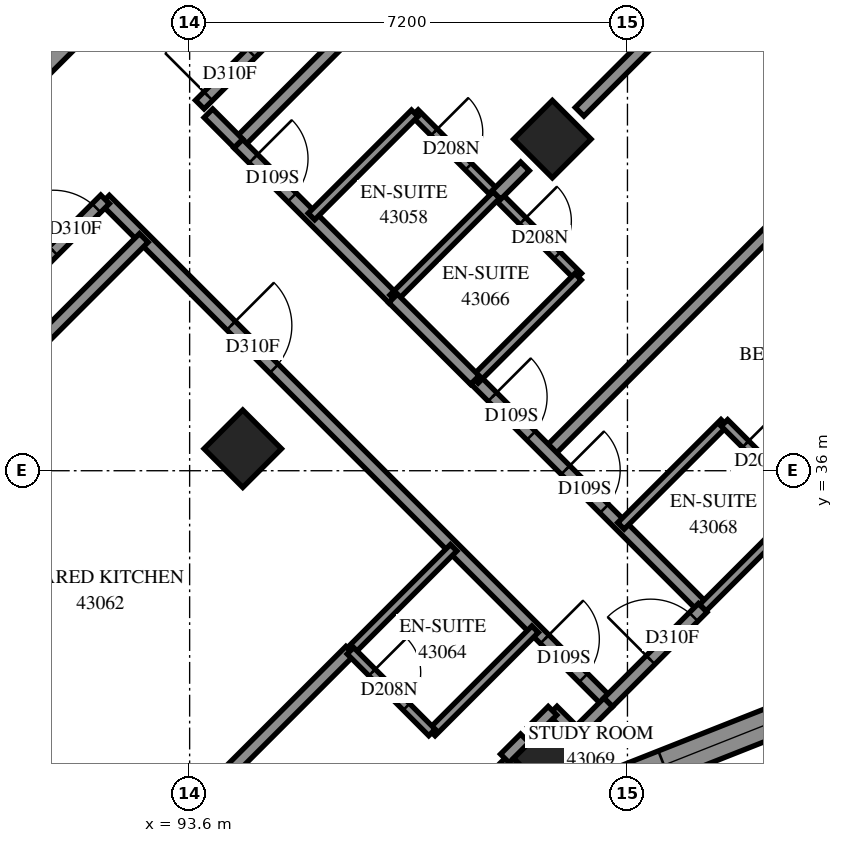
"""IFC4 building model, lengths in metres.
Left out: names, types, materials, properties, quantities, classifications, styles, units other than length and angle.
Written with IfcOpenShell. Run it as: python <this file> out.ifc"""

import sys

from ifc_helpers import new_model, si_unit, direction, frame, frame_2d, origin, origin_2d, place, context, subcontext, project, spatial, polyline, rectangle, outline, extrude, element, fill, save


model = new_model("IFC4")
c1 = context("Model", 3, precision=1e-05, world=origin(), true_north=direction((0.0, 1.0)))
c2 = subcontext(c1, "Body", "Model", "MODEL_VIEW")
j1 = project(units=[si_unit("LENGTHUNIT", "METRE"), si_unit("PLANEANGLEUNIT", "RADIAN")], contexts=[c1])
p1 = place(None, origin())
s1 = spatial("IfcSite", under=j1, at=p1, CompositionType="ELEMENT")
p2 = place(p1, origin())
s2 = spatial("IfcBuilding", under=s1, at=p2, CompositionType="ELEMENT")
p3 = place(p2, frame((0.0, 0.0, 159.2)))
s3 = spatial("IfcBuildingStorey", under=s2, at=p3, CompositionType="ELEMENT", Elevation=159.2)
for number, where, z_axis, x_axis in (
    (1, (99.565, 41.453, 0.0), (0.0, 0.0, 1.0), (0.707, -0.707, 0.0)),
    (2, (94.474, 36.362, 0.0), (0.0, 0.0, 1.0), (0.707, -0.707, 0.0)),
    (3, (99.565, 31.271, 0.0), (0.0, 0.0, 1.0), (0.707, -0.707, 0.0)),
):
    element("IfcColumn", number, at=place(p3, frame(where, z_axis=z_axis, x_axis=x_axis)), inside=s3, PredefinedType="COLUMN", context=c2, shape_type="SweptSolid", body=[
        extrude(rectangle(XDim=0.9, YDim=0.9, at=origin_2d()), origin(), (0.0, 0.0, 1.0), 3.1),
    ])
p4 = place(p3, frame((87.049, 38.695, -0.3), z_axis=(0.0, 0.0, 1.0), x_axis=(0.7071067812, 0.7071067812, 0.0)))
e4 = element("IfcWall", 4, at=p4, inside=s3, PredefinedType="SHEAR", context=c2, shape_type="SweptSolid", body=[
    extrude(rectangle(XDim=14.4, YDim=0.6, at=frame_2d((7.2, 0.0))), origin(), (0.0, 0.0, 1.0), 2.7),
])
p5 = place(p4, frame((4.55, 0.0, 0.3)))
e5 = element("IfcOpeningElement", 5, at=p5, cuts=e4, PredefinedType="OPENING", context=c2, shape_type="SweptSolid", body=[
    extrude(rectangle(XDim=1.1, YDim=2.1, at=frame_2d((0.55, 1.05))), frame((0.0, 0.31, 0.0), z_axis=(0.0, -1.0, 0.0), x_axis=(1.0, 0.0, 0.0)), (0.0, 0.0, 1.0), 0.62),
])
p6 = place(p4, frame((11.35, 0.0, 0.3)))
e6 = element("IfcOpeningElement", 6, at=p6, cuts=e4, PredefinedType="OPENING", context=c2, shape_type="SweptSolid", body=[
    extrude(rectangle(XDim=1.1, YDim=2.1, at=frame_2d((0.55, 1.05))), frame((0.0, 0.31, 0.0), z_axis=(0.0, -1.0, 0.0), x_axis=(1.0, 0.0, 0.0)), (0.0, 0.0, 1.0), 0.62),
])
p7 = place(p3, frame((100.817, 30.929, 0.0), z_axis=(0.0, 0.0, 1.0), x_axis=(0.9299300863, 0.3677363656, 0.0)))
e7 = element("IfcWall", 7, at=p7, inside=s3, PredefinedType="SOLIDWALL", context=c2, shape_type="SweptSolid", body=[
    extrude(outline(polyline([(0.108, -0.25), (5.642, -0.25), (5.416, 0.25), (-0.108, 0.25), (0.108, -0.25)])), origin(), (0.0, 0.0, 1.0), 3.1),
])
p8 = place(p7, frame((0.626, 0.0, 0.45)))
e8 = element("IfcOpeningElement", 8, at=p8, cuts=e7, PredefinedType="OPENING", context=c2, shape_type="SweptSolid", body=[
    extrude(rectangle(XDim=2.8, YDim=2.5, at=frame_2d((1.4, 1.25))), frame((0.0, 0.26, 0.0), z_axis=(0.0, -1.0, 0.0), x_axis=(1.0, 0.0, 0.0)), (0.0, 0.0, 1.0), 0.52),
])
p9 = place(p3, frame((94.401, 41.383, 0.0), z_axis=(0.0, 0.0, 1.0), x_axis=(0.7071067812, 0.7071067812, 0.0)))
e9 = element("IfcWall", 9, at=p9, inside=s3, PredefinedType="PARTITIONING", context=c2, shape_type="SweptSolid", body=[
    extrude(rectangle(XDim=12.04, YDim=0.2, at=frame_2d((6.02, 0.0))), origin(), (0.0, 0.0, 1.0), 3.1),
])
p10 = place(p3, frame((92.209, 40.459, 0.0), z_axis=(0.0, 0.0, 1.0), x_axis=(0.7071067812, -0.7071067812, 0.0)))
e10 = element("IfcWall", 10, at=p10, inside=s3, PredefinedType="PARTITIONING", context=c2, shape_type="SweptSolid", body=[
    extrude(rectangle(XDim=11.698, YDim=0.2, at=frame_2d((5.849, 0.0))), origin(), (0.0, 0.0, 1.0), 3.1),
])
p11 = place(p10, frame((2.931, 0.0, 0.0)))
e11 = element("IfcOpeningElement", 11, at=p11, cuts=e10, PredefinedType="OPENING", context=c2, shape_type="SweptSolid", body=[
    extrude(rectangle(XDim=1.0, YDim=2.1, at=frame_2d((0.5, 1.05))), frame((0.0, 0.11, 0.0), z_axis=(0.0, -1.0, 0.0), x_axis=(1.0, 0.0, 0.0)), (0.0, 0.0, 1.0), 0.22),
])
p12 = place(p10, frame((10.223, 0.0, 0.0)))
e12 = element("IfcOpeningElement", 12, at=p12, cuts=e10, PredefinedType="OPENING", context=c2, shape_type="SweptSolid", body=[
    extrude(rectangle(XDim=0.9, YDim=2.1, at=frame_2d((0.45, 1.05))), frame((0.0, 0.11, 0.0), z_axis=(0.0, -1.0, 0.0), x_axis=(1.0, 0.0, 0.0)), (0.0, 0.0, 1.0), 0.22),
])
p13 = place(p3, frame((93.767, 42.021, 0.0), z_axis=(0.0, 0.0, 1.0), x_axis=(0.7071067812, 0.7071067812, 0.0)))
e13 = element("IfcWall", 13, at=p13, inside=s3, PredefinedType="PARTITIONING", context=c2, shape_type="SweptSolid", body=[
    extrude(rectangle(XDim=9.998, YDim=0.2, at=frame_2d((4.999, 0.0))), origin(), (0.0, 0.0, 1.0), 3.1),
])
p14 = place(p13, frame((0.196, 0.0, 0.0)))
e14 = element("IfcOpeningElement", 14, at=p14, cuts=e13, PredefinedType="OPENING", context=c2, shape_type="SweptSolid", body=[
    extrude(rectangle(XDim=1.0, YDim=2.1, at=frame_2d((0.5, 1.05))), frame((0.0, 0.11, 0.0), z_axis=(0.0, -1.0, 0.0), x_axis=(1.0, 0.0, 0.0)), (0.0, 0.0, 1.0), 0.22),
])
p15 = place(p3, frame((86.837, 35.091, 0.0), z_axis=(0.0, 0.0, 1.0), x_axis=(0.7071067812, 0.7071067812, 0.0)))
e15 = element("IfcWall", 15, at=p15, inside=s3, PredefinedType="PARTITIONING", context=c2, shape_type="SweptSolid", body=[
    extrude(rectangle(XDim=7.597, YDim=0.2, at=frame_2d((3.799, 0.0))), origin(), (0.0, 0.0, 1.0), 3.1),
])
p16 = place(p15, frame((6.395, 0.0, 0.0)))
e16 = element("IfcOpeningElement", 16, at=p16, cuts=e15, PredefinedType="OPENING", context=c2, shape_type="SweptSolid", body=[
    extrude(rectangle(XDim=1.0, YDim=2.1, at=frame_2d((0.5, 1.05))), frame((0.0, 0.11, 0.0), z_axis=(0.0, -1.0, 0.0), x_axis=(1.0, 0.0, 0.0)), (0.0, 0.0, 1.0), 0.22),
])
p17 = place(p3, frame((91.366, 28.168, 0.0), z_axis=(0.0, 0.0, 1.0), x_axis=(0.7072591319, 0.7069543977, 0.0)))
e17 = element("IfcWall", 17, at=p17, inside=s3, PredefinedType="PARTITIONING", context=c2, shape_type="SweptSolid", body=[
    extrude(rectangle(XDim=6.891, YDim=0.2, at=frame_2d((3.446, 0.0))), origin(), (0.0, 0.0, 1.0), 3.1),
])
p18 = place(p3, frame((99.494, 36.292, 0.0), z_axis=(0.0, 0.0, 1.0), x_axis=(0.7071067812, 0.7071067812, 0.0)))
e18 = element("IfcWall", 18, at=p18, inside=s3, PredefinedType="PARTITIONING", context=c2, shape_type="SweptSolid", body=[
    extrude(rectangle(XDim=6.799, YDim=0.2, at=frame_2d((3.4, 0.0))), origin(), (0.0, 0.0, 1.0), 3.1),
])
p19 = place(p3, frame((100.013, 41.903, 0.0), z_axis=(0.0, 0.0, 1.0), x_axis=(0.7071067812, 0.7071067812, 0.0)))
e19 = element("IfcWall", 19, at=p19, inside=s3, PredefinedType="PARTITIONING", context=c2, shape_type="SweptSolid", body=[
    extrude(rectangle(XDim=5.928, YDim=0.2, at=frame_2d((2.964, 0.0))), origin(), (0.0, 0.0, 1.0), 3.1),
])
p20 = place(p3, frame((98.295, 37.497, 0.0), z_axis=(0.0, 0.0, 1.0), x_axis=(0.7071067812, -0.7071067812, 0.0)))
e20 = element("IfcWall", 20, at=p20, inside=s3, PredefinedType="PARTITIONING", context=c2, shape_type="SweptSolid", body=[
    extrude(rectangle(XDim=5.301, YDim=0.2, at=frame_2d((2.65, 0.0))), origin(), (0.0, 0.0, 1.0), 3.1),
])
p21 = place(p20, frame((0.401, 0.0, 0.0)))
e21 = element("IfcOpeningElement", 21, at=p21, cuts=e20, PredefinedType="OPENING", context=c2, shape_type="SweptSolid", body=[
    extrude(rectangle(XDim=0.9, YDim=2.1, at=frame_2d((0.45, 1.05))), frame((0.0, 0.11, 0.0), z_axis=(0.0, -1.0, 0.0), x_axis=(1.0, 0.0, 0.0)), (0.0, 0.0, 1.0), 0.22),
])
p22 = place(p20, frame((2.1, 0.0, 0.0)))
e22 = element("IfcOpeningElement", 22, at=p22, cuts=e20, PredefinedType="OPENING", context=c2, shape_type="SweptSolid", body=[
    extrude(rectangle(XDim=0.9, YDim=2.1, at=frame_2d((0.45, 1.05))), frame((0.0, 0.11, 0.0), z_axis=(0.0, -1.0, 0.0), x_axis=(1.0, 0.0, 0.0)), (0.0, 0.0, 1.0), 0.22),
])
p23 = place(p3, frame((89.586, 36.57, 0.0), z_axis=(0.0, 0.0, 1.0), x_axis=(0.7073237184, 0.7068897774, 0.0)))
e23 = element("IfcWall", 23, at=p23, inside=s3, PredefinedType="PARTITIONING", context=c2, shape_type="SweptSolid", body=[
    extrude(rectangle(XDim=4.609, YDim=0.2, at=frame_2d((2.304, 0.0))), origin(), (0.0, 0.0, 1.0), 3.1),
])
p24 = place(p3, frame((97.305, 41.881, 0.0), z_axis=(0.0, 0.0, 1.0), x_axis=(0.7067382634, -0.707475107, 0.0)))
e24 = element("IfcWall", 24, at=p24, inside=s3, PredefinedType="PARTITIONING", context=c2, shape_type="SweptSolid", body=[
    extrude(rectangle(XDim=3.8, YDim=0.15, at=frame_2d((1.9, 0.0))), origin(), (0.0, 0.0, 1.0), 3.1),
])
p25 = place(p24, frame((0.445, 0.0, 0.0)))
e25 = element("IfcOpeningElement", 25, at=p25, cuts=e24, PredefinedType="OPENING", context=c2, shape_type="SweptSolid", body=[
    extrude(rectangle(XDim=0.8, YDim=2.1, at=frame_2d((0.4, 1.05))), frame((0.0, 0.085, 0.0), z_axis=(0.0, -1.0, 0.0), x_axis=(1.0, 0.0, 0.0)), (0.0, 0.0, 1.0), 0.17),
])
p26 = place(p24, frame((2.507, 0.0, 0.0)))
e26 = element("IfcOpeningElement", 26, at=p26, cuts=e24, PredefinedType="OPENING", context=c2, shape_type="SweptSolid", body=[
    extrude(rectangle(XDim=0.8, YDim=2.1, at=frame_2d((0.4, 1.05))), frame((0.0, 0.085, 0.0), z_axis=(0.0, -1.0, 0.0), x_axis=(1.0, 0.0, 0.0)), (0.0, 0.0, 1.0), 0.17),
])
p27 = place(p3, frame((94.399, 41.379, 0.0), z_axis=(0.0, 0.0, 1.0), x_axis=(0.7071067812, -0.7071067812, 0.0)))
e27 = element("IfcWall", 27, at=p27, inside=s3, PredefinedType="PARTITIONING", context=c2, shape_type="SweptSolid", body=[
    extrude(rectangle(XDim=3.601, YDim=0.2, at=frame_2d((1.8, 0.0))), origin(), (0.0, 0.0, 1.0), 3.1),
])
p28 = place(p27, frame((0.35, 0.0, 0.0)))
e28 = element("IfcOpeningElement", 28, at=p28, cuts=e27, PredefinedType="OPENING", context=c2, shape_type="SweptSolid", body=[
    extrude(rectangle(XDim=0.9, YDim=2.1, at=frame_2d((0.45, 1.05))), frame((0.0, 0.11, 0.0), z_axis=(0.0, -1.0, 0.0), x_axis=(1.0, 0.0, 0.0)), (0.0, 0.0, 1.0), 0.22),
])
for number, where, z_axis, x_axis in (
    (29, (95.603, 40.181, 0.0), (0.0, 0.0, 1.0), (0.707, 0.707, 0.0)),
    (30, (96.947, 38.837, 0.0), (0.0, 0.0, 1.0), (0.707, 0.707, 0.0)),
    (31, (97.583, 31.695, 0.0), (0.0, 0.0, 1.0), (0.707, 0.707, 0.0)),
):
    element("IfcWall", number, at=place(p3, frame(where, z_axis=z_axis, x_axis=x_axis)), inside=s3, PredefinedType="PARTITIONING", context=c2, shape_type="SweptSolid", body=[
        extrude(rectangle(XDim=2.401, YDim=0.15, at=frame_2d((1.201, 0.0))), origin(), (0.0, 0.0, 1.0), 3.1),
    ])
for number, where, z_axis, x_axis in (
    (32, (100.693, 35.093, 0.0), (0.0, 0.0, 1.0), (0.708, 0.707, 0.0)),
    (33, (96.245, 33.035, 0.0), (0.0, 0.0, 1.0), (0.707, 0.708, 0.0)),
):
    element("IfcWall", number, at=place(p3, frame(where, z_axis=z_axis, x_axis=x_axis)), inside=s3, PredefinedType="PARTITIONING", context=c2, shape_type="SweptSolid", body=[
        extrude(rectangle(XDim=2.4, YDim=0.15, at=frame_2d((1.2, 0.0))), origin(), (0.0, 0.0, 1.0), 3.1),
    ])
p29 = place(p3, frame((98.291, 37.495, 0.0), z_axis=(0.0, 0.0, 1.0), x_axis=(0.7071067812, 0.7071067812, 0.0)))
e34 = element("IfcWall", 34, at=p29, inside=s3, PredefinedType="PARTITIONING", context=c2, shape_type="SweptSolid", body=[
    extrude(rectangle(XDim=2.398, YDim=0.15, at=frame_2d((1.199, 0.0))), origin(), (0.0, 0.0, 1.0), 3.1),
])
p30 = place(p3, frame((102.039, 33.747, 0.0), z_axis=(0.0, 0.0, 1.0), x_axis=(0.7071067812, 0.7071067812, 0.0)))
e35 = element("IfcWall", 35, at=p30, inside=s3, PredefinedType="PARTITIONING", context=c2, shape_type="SweptSolid", body=[
    extrude(rectangle(XDim=2.398, YDim=0.15, at=frame_2d((1.199, 0.0))), origin(), (0.0, 0.0, 1.0), 2.6),
])
p31 = place(p3, frame((100.483, 32.191, 0.0), z_axis=(0.0, 0.0, 1.0), x_axis=(0.7071067812, 0.7071067812, 0.0)))
e36 = element("IfcWall", 36, at=p31, inside=s3, PredefinedType="PARTITIONING", context=c2, shape_type="SweptSolid", body=[
    extrude(rectangle(XDim=2.198, YDim=0.2, at=frame_2d((1.099, 0.0))), origin(), (0.0, 0.0, 1.0), 2.6),
])
p32 = place(p31, frame((0.987, 0.0, 0.0)))
e37 = element("IfcOpeningElement", 37, at=p32, cuts=e36, PredefinedType="OPENING", context=c2, shape_type="SweptSolid", body=[
    extrude(rectangle(XDim=1.0, YDim=2.1, at=frame_2d((0.5, 1.05))), frame((0.0, 0.11, 0.0), z_axis=(0.0, -1.0, 0.0), x_axis=(1.0, 0.0, 0.0)), (0.0, 0.0, 1.0), 0.22),
])
p33 = place(p3, frame((96.946, 38.834, 0.0), z_axis=(0.0, 0.0, 1.0), x_axis=(0.7076330979, -0.7065800724, 0.0)))
e38 = element("IfcWall", 38, at=p33, inside=s3, PredefinedType="PARTITIONING", context=c2, shape_type="SweptSolid", body=[
    extrude(rectangle(XDim=1.899, YDim=0.2, at=frame_2d((0.95, 0.0))), origin(), (0.0, 0.0, 1.0), 3.1),
])
p34 = place(p3, frame((102.394, 36.786, 0.0), z_axis=(0.0, 0.0, 1.0), x_axis=(0.7065800724, -0.7076330979, 0.0)))
e39 = element("IfcWall", 39, at=p34, inside=s3, PredefinedType="PARTITIONING", context=c2, shape_type="SweptSolid", body=[
    extrude(rectangle(XDim=1.899, YDim=0.15, at=frame_2d((0.95, 0.0))), origin(), (0.0, 0.0, 1.0), 3.1),
])
p35 = place(p34, frame((0.492, 0.0, 0.0)))
e40 = element("IfcOpeningElement", 40, at=p35, cuts=e39, PredefinedType="OPENING", context=c2, shape_type="SweptSolid", body=[
    extrude(rectangle(XDim=0.8, YDim=2.1, at=frame_2d((0.4, 1.05))), frame((0.0, 0.085, 0.0), z_axis=(0.0, -1.0, 0.0), x_axis=(1.0, 0.0, 0.0)), (0.0, 0.0, 1.0), 0.17),
])
p36 = place(p3, frame((96.243, 33.039, 0.0), z_axis=(0.0, 0.0, 1.0), x_axis=(0.7065800724, -0.7076330979, 0.0)))
e41 = element("IfcWall", 41, at=p36, inside=s3, PredefinedType="PARTITIONING", context=c2, shape_type="SweptSolid", body=[
    extrude(rectangle(XDim=1.899, YDim=0.15, at=frame_2d((0.95, 0.0))), origin(), (0.0, 0.0, 1.0), 3.1),
])
p37 = place(p36, frame((0.504, 0.0, 0.0)))
e42 = element("IfcOpeningElement", 42, at=p37, cuts=e41, PredefinedType="OPENING", context=c2, shape_type="SweptSolid", body=[
    extrude(rectangle(XDim=0.8, YDim=2.1, at=frame_2d((0.4, 1.05))), frame((0.0, 0.085, 0.0), z_axis=(0.0, -1.0, 0.0), x_axis=(1.0, 0.0, 0.0)), (0.0, 0.0, 1.0), 0.17),
])
p38 = place(p3, frame((93.909, 41.879, 0.0), z_axis=(0.0, 0.0, 1.0), x_axis=(0.7056768426, -0.7085338339, 0.0)))
e43 = element("IfcWall", 43, at=p38, inside=s3, PredefinedType="PARTITIONING", context=c2, shape_type="SweptSolid", body=[
    extrude(rectangle(XDim=0.7, YDim=0.2, at=frame_2d((0.35, 0.0))), origin(), (0.0, 0.0, 1.0), 3.1),
])
p39 = place(p3, frame((98.645, 40.535, 0.0), z_axis=(0.0, 0.0, 1.0), x_axis=(0.7071067812, 0.7071067812, 0.0)))
e44 = element("IfcWall", 44, at=p39, inside=s3, PredefinedType="PARTITIONING", context=c2, shape_type="SweptSolid", body=[
    extrude(rectangle(XDim=0.665, YDim=0.2, at=frame_2d((0.332, 0.0))), origin(), (0.0, 0.0, 1.0), 3.1),
])
p40 = place(p3, frame((100.013, 31.721, 0.0), z_axis=(0.0, 0.0, 1.0), x_axis=(0.7071067812, 0.7071067812, 0.0)))
e45 = element("IfcWall", 45, at=p40, inside=s3, PredefinedType="PARTITIONING", context=c2, shape_type="SweptSolid", body=[
    extrude(rectangle(XDim=0.665, YDim=0.2, at=frame_2d((0.332, 0.0))), origin(), (0.0, 0.0, 1.0), 2.6),
])
p41 = place(p3, frame((99.571, 32.055, 0.0), z_axis=(0.0, 0.0, 1.0), x_axis=(0.7092270271, -0.7049801586, 0.0)))
e46 = element("IfcWall", 46, at=p41, inside=s3, PredefinedType="PARTITIONING", context=c2, shape_type="SweptSolid", body=[
    extrude(rectangle(XDim=0.471, YDim=0.2, at=frame_2d((0.235, 0.0))), origin(), (0.0, 0.0, 1.0), 3.1),
])
p42 = place(p3, frame((99.235, 31.721, 0.0), z_axis=(0.0, 0.0, 1.0), x_axis=(0.7071067812, 0.7071067812, 0.0)))
e47 = element("IfcWall", 47, at=p42, inside=s3, PredefinedType="PARTITIONING", context=c2, shape_type="SweptSolid", body=[
    extrude(rectangle(XDim=0.469, YDim=0.2, at=frame_2d((0.235, 0.0))), origin(), (0.0, 0.0, 1.0), 3.1),
])
p43 = place(p3, frame((98.781, 31.265, 0.0), z_axis=(0.0, 0.0, 1.0), x_axis=(0.7049672897, -0.7092398187, 0.0)))
e48 = element("IfcWall", 48, at=p43, inside=s3, PredefinedType="PARTITIONING", context=c2, shape_type="SweptSolid", body=[
    extrude(rectangle(XDim=0.468, YDim=0.2, at=frame_2d((0.234, 0.0))), origin(), (0.0, 0.0, 1.0), 3.1),
])
p44 = place(p3, frame((98.783, 31.269, 0.0), z_axis=(0.0, 0.0, 1.0), x_axis=(0.7071067812, 0.7071067812, 0.0)))
e49 = element("IfcWall", 49, at=p44, inside=s3, PredefinedType="PARTITIONING", context=c2, shape_type="SweptSolid", body=[
    extrude(rectangle(XDim=0.467, YDim=0.2, at=frame_2d((0.233, 0.0))), origin(), (0.0, 0.0, 1.0), 3.1),
])
p45 = place(p8, origin())
e50 = element("IfcWindow", 50, at=p45, inside=s3, PartitioningType="SINGLE_PANEL", PredefinedType="WINDOW", context=c2, shape_type="SweptSolid", body=[
    extrude(rectangle(XDim=2.8, YDim=2.5, at=frame_2d((1.4, 1.25))), frame((0.0, 0.18, 0.0), z_axis=(0.0, -1.0, 0.0), x_axis=(1.0, 0.0, 0.0)), (0.0, 0.0, 1.0), 0.06),
])
fill(e8, e50)
p46 = place(p14, origin())
e51 = element("IfcDoor", 51, at=p46, inside=s3, OperationType="SINGLE_SWING_LEFT", PredefinedType="DOOR", context=c2, shape_type="SweptSolid", body=[
    extrude(rectangle(XDim=1.0, YDim=2.1, at=frame_2d((0.5, 1.05))), frame((0.0, 0.025, 0.0), z_axis=(0.0, -1.0, 0.0), x_axis=(1.0, 0.0, 0.0)), (0.0, 0.0, 1.0), 0.05),
])
fill(e14, e51)
p47 = place(p28, origin())
e52 = element("IfcDoor", 52, at=p47, inside=s3, OperationType="SINGLE_SWING_RIGHT", PredefinedType="DOOR", context=c2, shape_type="SweptSolid", body=[
    extrude(rectangle(XDim=0.9, YDim=2.1, at=frame_2d((0.45, 1.05))), frame((0.0, 0.025, 0.0), z_axis=(0.0, -1.0, 0.0), x_axis=(1.0, 0.0, 0.0)), (0.0, 0.0, 1.0), 0.05),
])
fill(e28, e52)
p48 = place(p25, origin())
e53 = element("IfcDoor", 53, at=p48, inside=s3, OperationType="SINGLE_SWING_RIGHT", PredefinedType="DOOR", context=c2, shape_type="SweptSolid", body=[
    extrude(rectangle(XDim=0.8, YDim=2.1, at=frame_2d((0.4, 1.05))), frame((0.0, 0.025, 0.0), z_axis=(0.0, -1.0, 0.0), x_axis=(1.0, 0.0, 0.0)), (0.0, 0.0, 1.0), 0.05),
])
fill(e25, e53)
p49 = place(p16, origin())
e54 = element("IfcDoor", 54, at=p49, inside=s3, OperationType="SINGLE_SWING_LEFT", PredefinedType="DOOR", context=c2, shape_type="SweptSolid", body=[
    extrude(rectangle(XDim=1.0, YDim=2.1, at=frame_2d((0.5, 1.05))), frame((0.0, 0.025, 0.0), z_axis=(0.0, -1.0, 0.0), x_axis=(1.0, 0.0, 0.0)), (0.0, 0.0, 1.0), 0.05),
])
fill(e16, e54)
p50 = place(p11, origin())
e55 = element("IfcDoor", 55, at=p50, inside=s3, OperationType="SINGLE_SWING_LEFT", PredefinedType="DOOR", context=c2, shape_type="SweptSolid", body=[
    extrude(rectangle(XDim=1.0, YDim=2.1, at=frame_2d((0.5, 1.05))), frame((0.0, 0.025, 0.0), z_axis=(0.0, -1.0, 0.0), x_axis=(1.0, 0.0, 0.0)), (0.0, 0.0, 1.0), 0.05),
])
fill(e11, e55)
p51 = place(p12, origin())
e56 = element("IfcDoor", 56, at=p51, inside=s3, OperationType="SINGLE_SWING_LEFT", PredefinedType="DOOR", context=c2, shape_type="SweptSolid", body=[
    extrude(rectangle(XDim=0.9, YDim=2.1, at=frame_2d((0.45, 1.05))), frame((0.0, 0.025, 0.0), z_axis=(0.0, -1.0, 0.0), x_axis=(1.0, 0.0, 0.0)), (0.0, 0.0, 1.0), 0.05),
])
fill(e12, e56)
p52 = place(p37, origin())
e57 = element("IfcDoor", 57, at=p52, inside=s3, OperationType="SINGLE_SWING_RIGHT", PredefinedType="DOOR", context=c2, shape_type="SweptSolid", body=[
    extrude(rectangle(XDim=0.8, YDim=2.1, at=frame_2d((0.4, 1.05))), frame((0.0, 0.025, 0.0), z_axis=(0.0, -1.0, 0.0), x_axis=(1.0, 0.0, 0.0)), (0.0, 0.0, 1.0), 0.05),
])
fill(e42, e57)
p53 = place(p21, origin())
e58 = element("IfcDoor", 58, at=p53, inside=s3, OperationType="SINGLE_SWING_LEFT", PredefinedType="DOOR", context=c2, shape_type="SweptSolid", body=[
    extrude(rectangle(XDim=0.9, YDim=2.1, at=frame_2d((0.45, 1.05))), frame((0.0, 0.025, 0.0), z_axis=(0.0, -1.0, 0.0), x_axis=(1.0, 0.0, 0.0)), (0.0, 0.0, 1.0), 0.05),
])
fill(e21, e58)
p54 = place(p26, origin())
e59 = element("IfcDoor", 59, at=p54, inside=s3, OperationType="SINGLE_SWING_RIGHT", PredefinedType="DOOR", context=c2, shape_type="SweptSolid", body=[
    extrude(rectangle(XDim=0.8, YDim=2.1, at=frame_2d((0.4, 1.05))), frame((0.0, 0.025, 0.0), z_axis=(0.0, -1.0, 0.0), x_axis=(1.0, 0.0, 0.0)), (0.0, 0.0, 1.0), 0.05),
])
fill(e26, e59)
p55 = place(p22, origin())
e60 = element("IfcDoor", 60, at=p55, inside=s3, OperationType="SINGLE_SWING_RIGHT", PredefinedType="DOOR", context=c2, shape_type="SweptSolid", body=[
    extrude(rectangle(XDim=0.9, YDim=2.1, at=frame_2d((0.45, 1.05))), frame((0.0, 0.025, 0.0), z_axis=(0.0, -1.0, 0.0), x_axis=(1.0, 0.0, 0.0)), (0.0, 0.0, 1.0), 0.05),
])
fill(e22, e60)
p56 = place(p35, origin())
e61 = element("IfcDoor", 61, at=p56, inside=s3, OperationType="SINGLE_SWING_RIGHT", PredefinedType="DOOR", context=c2, shape_type="SweptSolid", body=[
    extrude(rectangle(XDim=0.8, YDim=2.1, at=frame_2d((0.4, 1.05))), frame((0.0, 0.025, 0.0), z_axis=(0.0, -1.0, 0.0), x_axis=(1.0, 0.0, 0.0)), (0.0, 0.0, 1.0), 0.05),
])
fill(e40, e61)
p57 = place(p32, origin())
e62 = element("IfcDoor", 62, at=p57, inside=s3, OperationType="SINGLE_SWING_RIGHT", PredefinedType="DOOR", context=c2, shape_type="SweptSolid", body=[
    extrude(rectangle(XDim=1.0, YDim=2.1, at=frame_2d((0.5, 1.05))), frame((0.0, 0.025, 0.0), z_axis=(0.0, -1.0, 0.0), x_axis=(1.0, 0.0, 0.0)), (0.0, 0.0, 1.0), 0.05),
])
fill(e37, e62)
save(model, sys.argv[1])
